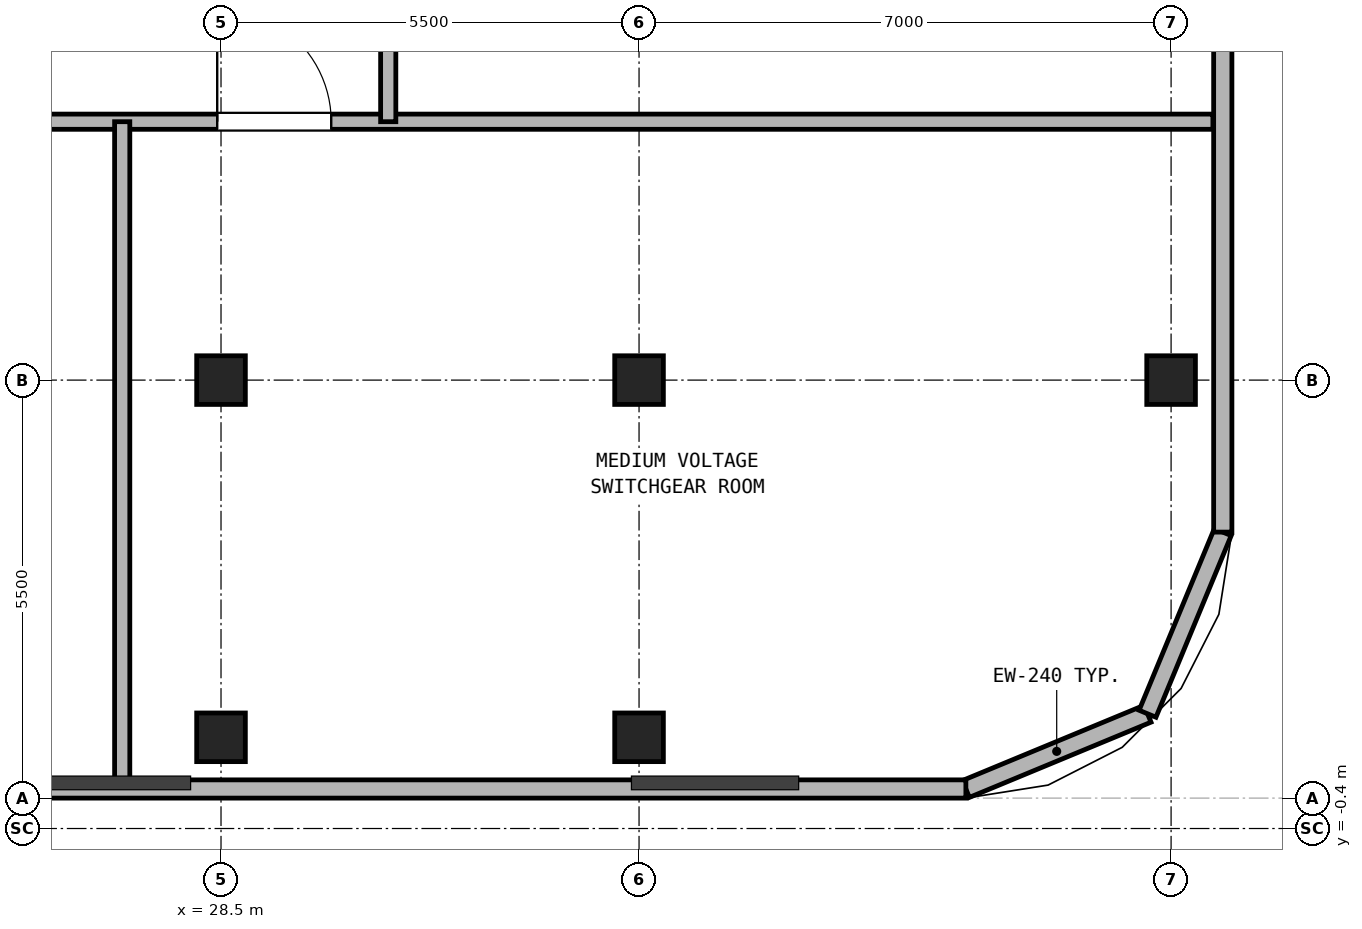
"""IFC4 building model, lengths in metres.
Left out: names, types, materials, properties, quantities, classifications, styles, units other than length and angle.
Written with IfcOpenShell. Run it as: python <this file> out.ifc"""

import sys

from ifc_helpers import new_model, si_unit, direction, frame, frame_2d, origin, origin_2d, place, context, subcontext, project, spatial, rectangle, hollow_rectangle, extrude, source, transform, mapped, element, fill, save


model = new_model("IFC4")
c1 = context("Model", 3, precision=1e-05, world=origin(), true_north=direction((0.0, 1.0)))
c2 = subcontext(c1, "Body", "Model", "MODEL_VIEW")
j1 = project(units=[si_unit("LENGTHUNIT", "METRE"), si_unit("PLANEANGLEUNIT", "RADIAN")], contexts=[c1])
p1 = place(None, origin())
s1 = spatial("IfcSite", under=j1, at=p1, CompositionType="ELEMENT")
p2 = place(p1, origin())
s2 = spatial("IfcBuilding", under=s1, at=p2, CompositionType="ELEMENT")
p3 = place(p2, frame((0.0, 0.0, 215.6)))
s3 = spatial("IfcBuildingStorey", under=s2, at=p3, CompositionType="ELEMENT", Elevation=215.6)
m1 = source(origin(), c2, "Body", "SweptSolid", [
    extrude(hollow_rectangle(XDim=0.64, YDim=0.64, WallThickness=0.035, at=origin_2d()), origin(), (0.0, 0.0, 1.0), 4.28),
])
for number, where, z_axis, x_axis in (
    (1, (28.5, 0.8, 0.0), (0.0, 0.0, 1.0), (1.0, 0.0, 0.0)),
    (2, (34.0, 0.8, 0.0), (0.0, 0.0, 1.0), (1.0, 0.0, 0.0)),
    (3, (41.0, 5.5, 0.0), (0.0, 0.0, 1.0), (1.0, 0.0, 0.0)),
    (4, (28.5, 5.5, 0.0), (0.0, 0.0, 1.0), (1.0, 0.0, 0.0)),
    (5, (34.0, 5.5, 0.0), (0.0, 0.0, 1.0), (1.0, 0.0, 0.0)),
):
    element("IfcColumn", number, at=place(p3, frame(where, z_axis=z_axis, x_axis=x_axis)), inside=s3, PredefinedType="COLUMN", context=c2, shape_type="MappedRepresentation", body=[
        mapped(m1, transform((0.0, 0.0, 0.0), x_axis=(1.0, 0.0, 0.0), y_axis=(0.0, 1.0, 0.0), z_axis=(0.0, 0.0, 1.0), scale=1.0)),
    ])
for number, where, z_axis, x_axis in (
    (6, (38.3, 0.12, 0.0), (0.0, 0.0, 1.0), (0.924, 0.383, 0.0)),
    (7, (40.69, 1.11, 0.0), (0.0, 0.0, 1.0), (0.383, 0.924, 0.0)),
):
    element("IfcWall", number, at=place(p3, frame(where, z_axis=z_axis, x_axis=x_axis)), inside=s3, PredefinedType="SOLIDWALL", context=c2, shape_type="SweptSolid", body=[
        extrude(rectangle(XDim=2.587, YDim=0.24, at=frame_2d((1.293, 0.0))), origin(), (0.0, 0.0, 1.0), 4.28),
    ])
p4 = place(p3, frame((41.68, 3.5, 0.0), z_axis=(0.0, 0.0, 1.0), x_axis=(0.0, 1.0, 0.0)))
e8 = element("IfcWall", 8, at=p4, inside=s3, PredefinedType="SOLIDWALL", context=c2, shape_type="SweptSolid", body=[
    extrude(rectangle(XDim=28.3, YDim=0.24, at=frame_2d((14.15, 0.0))), origin(), (0.0, 0.0, 1.0), 4.28),
])
p5 = place(p3, frame((8.7, 0.12, 0.0), z_axis=(0.0, 0.0, 1.0), x_axis=(1.0, 0.0, 0.0)))
e9 = element("IfcWall", 9, at=p5, inside=s3, PredefinedType="SOLIDWALL", context=c2, shape_type="SweptSolid", body=[
    extrude(rectangle(XDim=29.6, YDim=0.24, at=frame_2d((14.8, 0.0))), origin(), (0.0, 0.0, 1.0), 4.28),
])
p6 = place(p3, frame((5.45, 8.9, 0.0), z_axis=(0.0, 0.0, 1.0), x_axis=(1.0, 0.0, 0.0)))
e10 = element("IfcWall", 10, at=p6, inside=s3, PredefinedType="PARTITIONING", context=c2, shape_type="SweptSolid", body=[
    extrude(rectangle(XDim=36.1, YDim=0.2, at=frame_2d((18.05, 0.0))), origin(), (0.0, 0.0, 1.0), 4.28),
])
p7 = place(p6, frame((12.6, 0.0, 0.0)))
e11 = element("IfcOpeningElement", 11, at=p7, cuts=e10, PredefinedType="OPENING", context=c2, shape_type="SweptSolid", body=[
    extrude(rectangle(XDim=1.5, YDim=2.25, at=frame_2d((0.75, 1.125))), frame((0.0, 0.11, 0.0), z_axis=(0.0, -1.0, 0.0), x_axis=(1.0, 0.0, 0.0)), (0.0, 0.0, 1.0), 0.22),
])
p8 = place(p6, frame((18.05, 0.0, 0.0)))
e12 = element("IfcOpeningElement", 12, at=p8, cuts=e10, PredefinedType="OPENING", context=c2, shape_type="SweptSolid", body=[
    extrude(rectangle(XDim=1.5, YDim=2.25, at=frame_2d((0.75, 1.125))), frame((0.0, 0.11, 0.0), z_axis=(0.0, -1.0, 0.0), x_axis=(1.0, 0.0, 0.0)), (0.0, 0.0, 1.0), 0.22),
])
p9 = place(p6, frame((23.0, 0.0, 0.0)))
e13 = element("IfcOpeningElement", 13, at=p9, cuts=e10, PredefinedType="OPENING", context=c2, shape_type="SweptSolid", body=[
    extrude(rectangle(XDim=1.5, YDim=2.25, at=frame_2d((0.75, 1.125))), frame((0.0, 0.11, 0.0), z_axis=(0.0, -1.0, 0.0), x_axis=(1.0, 0.0, 0.0)), (0.0, 0.0, 1.0), 0.22),
])
p10 = place(p3, frame((30.7, 8.9, 0.0), z_axis=(0.0, 0.0, 1.0), x_axis=(0.0, 1.0, 0.0)))
e14 = element("IfcWall", 14, at=p10, inside=s3, PredefinedType="PARTITIONING", context=c2, shape_type="SweptSolid", body=[
    extrude(rectangle(XDim=19.85, YDim=0.2, at=frame_2d((9.925, 0.0))), origin(), (0.0, 0.0, 1.0), 4.28),
])
p11 = place(p10, frame((10.6, 0.0, 0.0)))
e15 = element("IfcOpeningElement", 15, at=p11, cuts=e14, PredefinedType="OPENING", context=c2, shape_type="SweptSolid", body=[
    extrude(rectangle(XDim=1.5, YDim=2.25, at=frame_2d((0.75, 1.125))), frame((0.0, 0.11, 0.0), z_axis=(0.0, -1.0, 0.0), x_axis=(1.0, 0.0, 0.0)), (0.0, 0.0, 1.0), 0.22),
])
p12 = place(p3, frame((27.2, 0.25, 0.0), z_axis=(0.0, 0.0, 1.0), x_axis=(0.0, 1.0, 0.0)))
e16 = element("IfcWall", 16, at=p12, inside=s3, PredefinedType="PARTITIONING", context=c2, shape_type="SweptSolid", body=[
    extrude(rectangle(XDim=8.65, YDim=0.2, at=frame_2d((4.325, 0.0))), origin(), (0.0, 0.0, 1.0), 4.28),
])
p13 = place(p9, frame((1.5, 0.0, 0.0), z_axis=(0.0, 0.0, 1.0), x_axis=(-1.0, 0.0, 0.0)))
e17 = element("IfcDoor", 17, at=p13, inside=s3, OperationType="SINGLE_SWING_LEFT", PredefinedType="DOOR", context=c2, shape_type="SweptSolid", body=[
    extrude(rectangle(XDim=1.5, YDim=2.25, at=frame_2d((0.75, 1.125))), frame((0.0, 0.025, 0.0), z_axis=(0.0, -1.0, 0.0), x_axis=(1.0, 0.0, 0.0)), (0.0, 0.0, 1.0), 0.05),
])
fill(e13, e17)
save(model, sys.argv[1])
